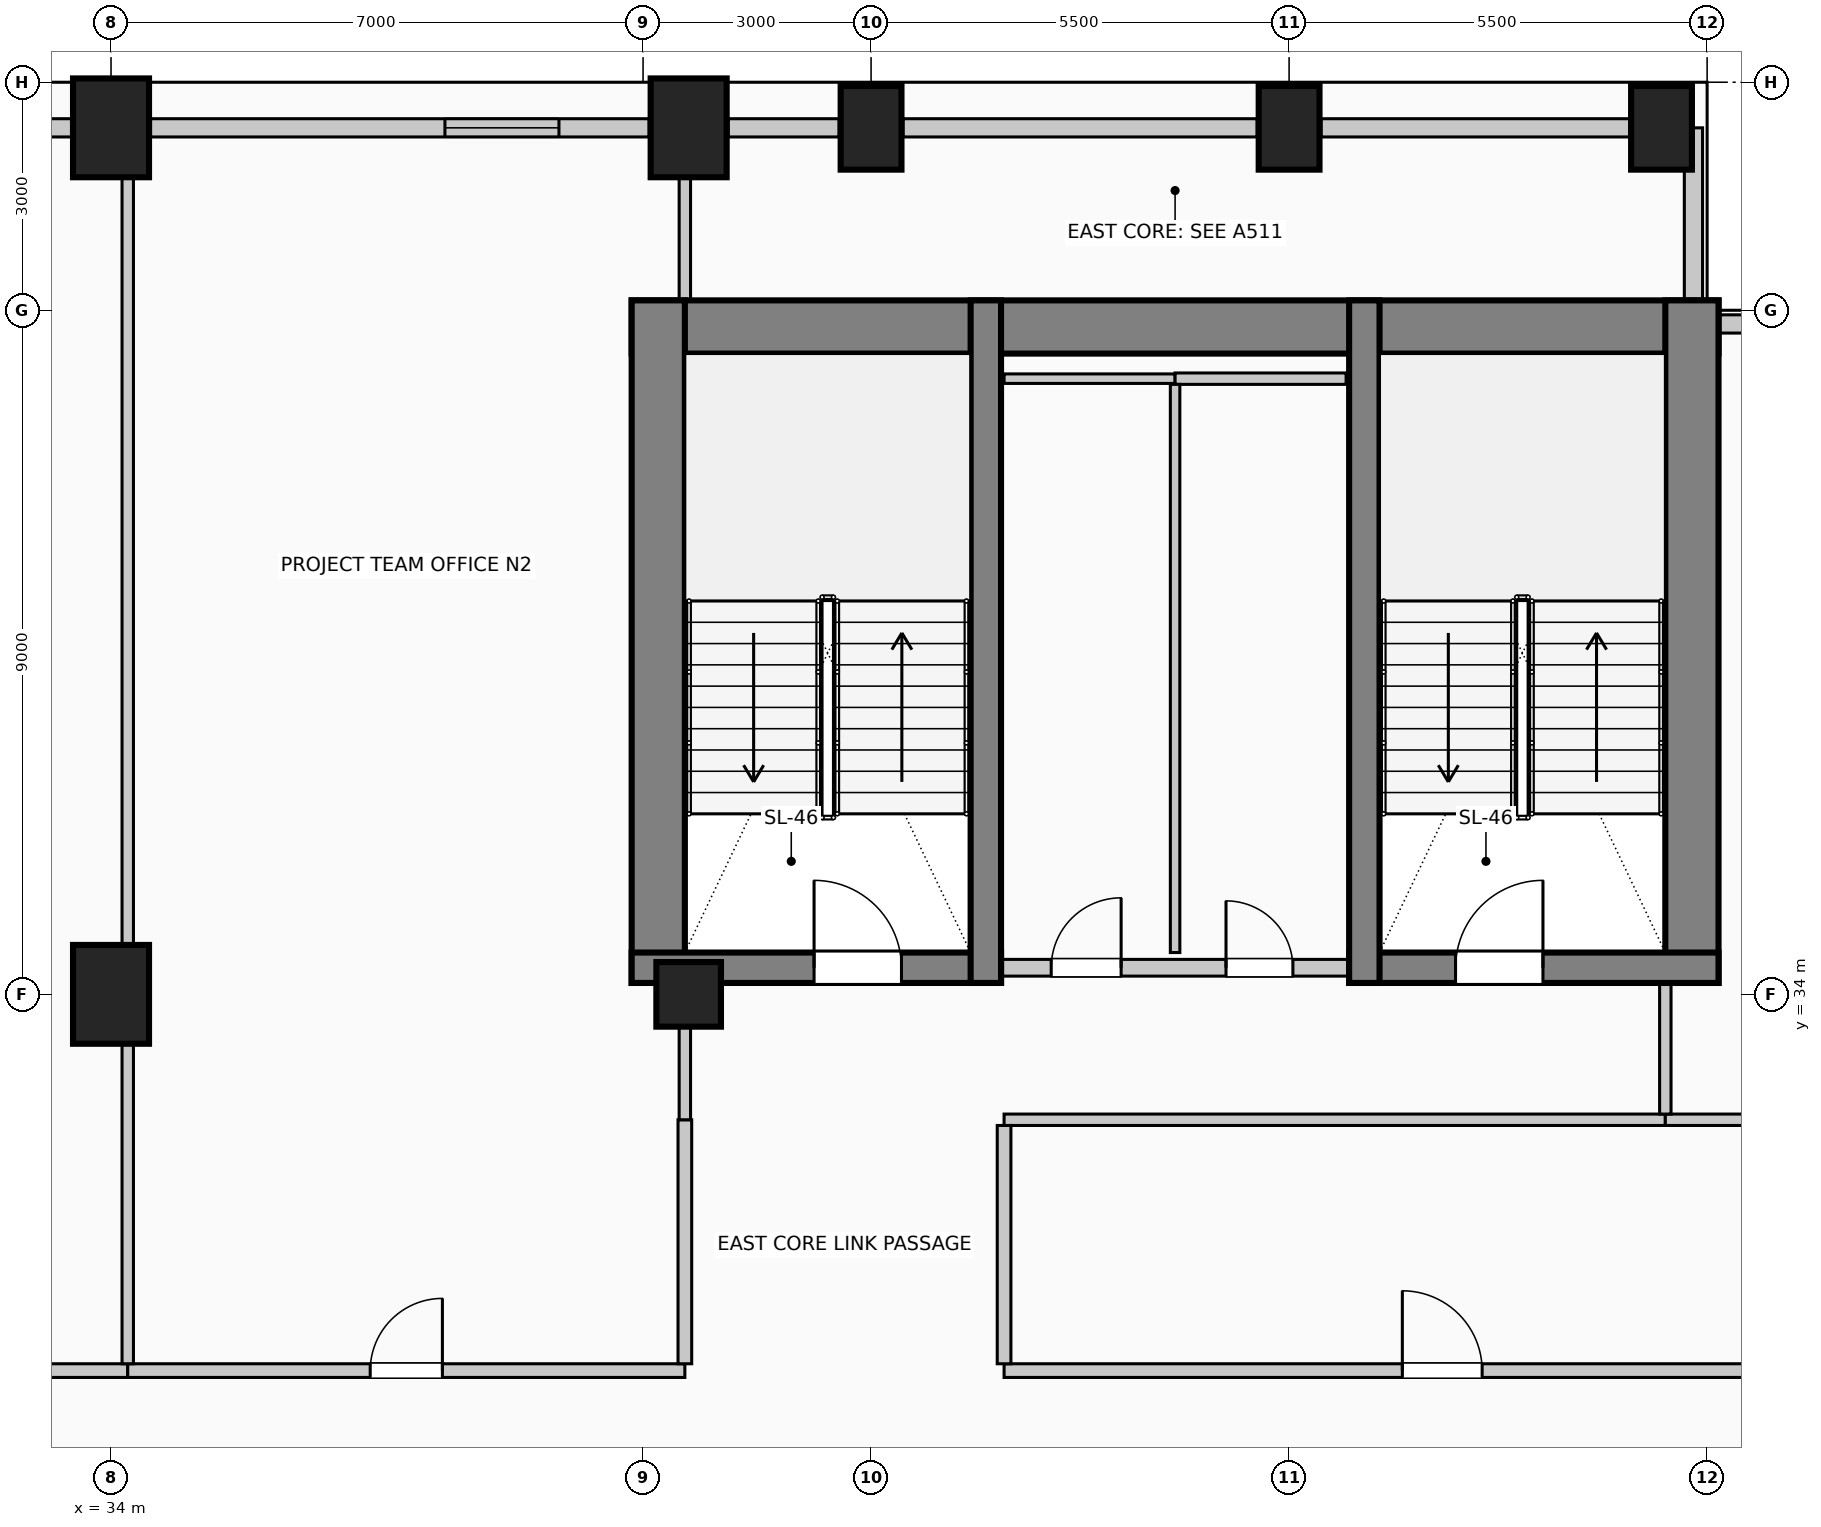
"""IFC4 building model, lengths in metres.
Left out: names, types, materials, properties, quantities, classifications, styles, units other than length and angle.
Written with IfcOpenShell. Run it as: python <this file> out.ifc"""

import sys

from ifc_helpers import new_model, si_unit, direction, frame, frame_2d, origin, origin_2d, place, context, subcontext, project, spatial, rectangle, circle, extrude, element, fill, save


model = new_model("IFC4")
c1 = context("Model", 3, precision=1e-05, world=origin(), true_north=direction((0.0, 1.0)))
c2 = subcontext(c1, "Body", "Model", "MODEL_VIEW")
j1 = project(units=[si_unit("LENGTHUNIT", "METRE"), si_unit("PLANEANGLEUNIT", "RADIAN")], contexts=[c1])
p1 = place(None, origin())
s1 = spatial("IfcSite", under=j1, at=p1, CompositionType="ELEMENT")
p2 = place(p1, origin())
s2 = spatial("IfcBuilding", under=s1, at=p2, CompositionType="ELEMENT")
p3 = place(p2, frame((0.0, 0.0, 210.6)))
s3 = spatial("IfcBuildingStorey", under=s2, at=p3, CompositionType="ELEMENT", Elevation=210.6)
p4 = place(p3, frame((40.85, 42.78, 0.0), z_axis=(0.0, 0.0, 1.0), x_axis=(1.0, 0.0, 0.0)))
e1 = element("IfcWall", 1, at=p4, inside=s3, PredefinedType="SHEAR", context=c2, shape_type="SweptSolid", body=[
    extrude(rectangle(XDim=14.3, YDim=0.7, at=frame_2d((7.15, 0.0))), origin(), (0.0, 0.0, 1.0), 4.0),
])
for number, where, z_axis, x_axis in (
    (2, (41.2, 34.15, 0.0), (0.0, 0.0, 1.0), (0.0, 1.0, 0.0)),
    (3, (54.8, 34.15, 0.0), (0.0, 0.0, 1.0), (0.0, 1.0, 0.0)),
):
    element("IfcWall", number, at=place(p3, frame(where, z_axis=z_axis, x_axis=x_axis)), inside=s3, PredefinedType="SHEAR", context=c2, shape_type="SweptSolid", body=[
        extrude(rectangle(XDim=8.98, YDim=0.7, at=frame_2d((4.49, 0.0))), origin(), (0.0, 0.0, 1.0), 4.0),
    ])
p5 = place(p3, frame((40.85, 34.35, 0.0), z_axis=(0.0, 0.0, 1.0), x_axis=(1.0, 0.0, 0.0)))
e4 = element("IfcWall", 4, at=p5, inside=s3, PredefinedType="SHEAR", context=c2, shape_type="SweptSolid", body=[
    extrude(rectangle(XDim=4.86, YDim=0.4, at=frame_2d((2.43, 0.0))), origin(), (0.0, 0.0, 1.0), 4.0),
])
p6 = place(p5, frame((2.4, 0.0, 0.0)))
e5 = element("IfcOpeningElement", 5, at=p6, cuts=e4, PredefinedType="OPENING", context=c2, shape_type="SweptSolid", body=[
    extrude(rectangle(XDim=1.15, YDim=2.2, at=frame_2d((0.575, 1.1))), frame((0.0, 0.21, 0.0), z_axis=(0.0, -1.0, 0.0), x_axis=(1.0, 0.0, 0.0)), (0.0, 0.0, 1.0), 0.42),
])
p7 = place(p3, frame((45.51, 34.15, 0.0), z_axis=(0.0, 0.0, 1.0), x_axis=(0.0, 1.0, 0.0)))
e6 = element("IfcWall", 6, at=p7, inside=s3, PredefinedType="SHEAR", context=c2, shape_type="SweptSolid", body=[
    extrude(rectangle(XDim=8.98, YDim=0.4, at=frame_2d((4.49, 0.0))), origin(), (0.0, 0.0, 1.0), 4.0),
])
p8 = place(p3, frame((50.29, 34.35, 0.0), z_axis=(0.0, 0.0, 1.0), x_axis=(1.0, 0.0, 0.0)))
e7 = element("IfcWall", 7, at=p8, inside=s3, PredefinedType="SHEAR", context=c2, shape_type="SweptSolid", body=[
    extrude(rectangle(XDim=4.86, YDim=0.4, at=frame_2d((2.43, 0.0))), origin(), (0.0, 0.0, 1.0), 4.0),
])
p9 = place(p8, frame((1.4, 0.0, 0.0)))
e8 = element("IfcOpeningElement", 8, at=p9, cuts=e7, PredefinedType="OPENING", context=c2, shape_type="SweptSolid", body=[
    extrude(rectangle(XDim=1.15, YDim=2.2, at=frame_2d((0.575, 1.1))), frame((0.0, 0.21, 0.0), z_axis=(0.0, -1.0, 0.0), x_axis=(1.0, 0.0, 0.0)), (0.0, 0.0, 1.0), 0.42),
])
p10 = place(p3, frame((50.49, 34.15, 0.0), z_axis=(0.0, 0.0, 1.0), x_axis=(0.0, 1.0, 0.0)))
e9 = element("IfcWall", 9, at=p10, inside=s3, PredefinedType="SHEAR", context=c2, shape_type="SweptSolid", body=[
    extrude(rectangle(XDim=8.98, YDim=0.4, at=frame_2d((4.49, 0.0))), origin(), (0.0, 0.0, 1.0), 4.0),
])
for number, where, z_axis, x_axis in (
    (10, (34.0, 45.4, 0.0), (0.0, 0.0, 1.0), (1.0, 0.0, 0.0)),
    (11, (41.6, 45.4, 0.0), (0.0, 0.0, 1.0), (1.0, 0.0, 0.0)),
):
    element("IfcColumn", number, at=place(p3, frame(where, z_axis=z_axis, x_axis=x_axis)), inside=s3, PredefinedType="COLUMN", context=c2, shape_type="SweptSolid", body=[
        extrude(rectangle(XDim=1.0, YDim=1.3, at=origin_2d()), origin(), (0.0, 0.0, 1.0), 4.0),
    ])
for number, where, z_axis, x_axis in (
    (12, (44.0, 45.4, 0.0), (0.0, 0.0, 1.0), (1.0, 0.0, 0.0)),
    (13, (49.5, 45.4, 0.0), (0.0, 0.0, 1.0), (1.0, 0.0, 0.0)),
    (14, (54.4, 45.4, 0.0), (0.0, 0.0, 1.0), (1.0, 0.0, 0.0)),
):
    element("IfcColumn", number, at=place(p3, frame(where, z_axis=z_axis, x_axis=x_axis)), inside=s3, PredefinedType="COLUMN", context=c2, shape_type="SweptSolid", body=[
        extrude(rectangle(XDim=0.8, YDim=1.1, at=origin_2d()), origin(), (0.0, 0.0, 1.0), 4.0),
    ])
p11 = place(p3, frame((34.0, 34.0, 0.0), z_axis=(0.0, 0.0, 1.0), x_axis=(1.0, 0.0, 0.0)))
e15 = element("IfcColumn", 15, at=p11, inside=s3, PredefinedType="COLUMN", context=c2, shape_type="SweptSolid", body=[
    extrude(rectangle(XDim=1.0, YDim=1.3, at=origin_2d()), origin(), (0.0, 0.0, 1.0), 4.0),
])
p12 = place(p3, frame((41.6, 34.0, 0.0), z_axis=(0.0, 0.0, 1.0), x_axis=(1.0, 0.0, 0.0)))
e16 = element("IfcColumn", 16, at=p12, inside=s3, PredefinedType="COLUMN", context=c2, shape_type="SweptSolid", body=[
    extrude(circle(Radius=0.425, at=origin_2d()), origin(), (0.0, 0.0, 1.0), 4.0),
])
p13 = place(p3, frame((29.42, 45.4, 0.0), z_axis=(0.0, 0.0, 1.0), x_axis=(1.0, 0.0, 0.0)))
e17 = element("IfcWall", 17, at=p13, inside=s3, PredefinedType="SOLIDWALL", context=c2, shape_type="SweptSolid", body=[
    extrude(rectangle(XDim=4.06, YDim=0.24, at=frame_2d((2.03, 0.0))), origin(), (0.0, 0.0, 1.0), 3.0),
])
p14 = place(p13, frame((1.28, 0.0, 0.42)))
e18 = element("IfcOpeningElement", 18, at=p14, cuts=e17, PredefinedType="OPENING", context=c2, shape_type="SweptSolid", body=[
    extrude(rectangle(XDim=1.5, YDim=2.2, at=frame_2d((0.75, 1.1))), frame((0.0, 0.13, 0.0), z_axis=(0.0, -1.0, 0.0), x_axis=(1.0, 0.0, 0.0)), (0.0, 0.0, 1.0), 0.26),
])
p15 = place(p3, frame((34.52, 45.4, 0.0), z_axis=(0.0, 0.0, 1.0), x_axis=(1.0, 0.0, 0.0)))
e19 = element("IfcWall", 19, at=p15, inside=s3, PredefinedType="SOLIDWALL", context=c2, shape_type="SweptSolid", body=[
    extrude(rectangle(XDim=6.56, YDim=0.24, at=frame_2d((3.28, 0.0))), origin(), (0.0, 0.0, 1.0), 3.0),
])
p16 = place(p15, frame((3.873, 0.0, 0.42)))
e20 = element("IfcOpeningElement", 20, at=p16, cuts=e19, PredefinedType="OPENING", context=c2, shape_type="SweptSolid", body=[
    extrude(rectangle(XDim=1.5, YDim=2.2, at=frame_2d((0.75, 1.1))), frame((0.0, 0.13, 0.0), z_axis=(0.0, -1.0, 0.0), x_axis=(1.0, 0.0, 0.0)), (0.0, 0.0, 1.0), 0.26),
])
p17 = place(p3, frame((42.12, 45.4, 0.0), z_axis=(0.0, 0.0, 1.0), x_axis=(1.0, 0.0, 0.0)))
e21 = element("IfcWall", 21, at=p17, inside=s3, PredefinedType="SOLIDWALL", context=c2, shape_type="SweptSolid", body=[
    extrude(rectangle(XDim=1.46, YDim=0.24, at=frame_2d((0.73, 0.0))), origin(), (0.0, 0.0, 1.0), 3.0),
])
p18 = place(p3, frame((44.42, 45.4, 0.0), z_axis=(0.0, 0.0, 1.0), x_axis=(1.0, 0.0, 0.0)))
e22 = element("IfcWall", 22, at=p18, inside=s3, PredefinedType="SOLIDWALL", context=c2, shape_type="SweptSolid", body=[
    extrude(rectangle(XDim=4.66, YDim=0.24, at=frame_2d((2.33, 0.0))), origin(), (0.0, 0.0, 1.0), 3.0),
])
p19 = place(p3, frame((49.92, 45.4, 0.0), z_axis=(0.0, 0.0, 1.0), x_axis=(1.0, 0.0, 0.0)))
e23 = element("IfcWall", 23, at=p19, inside=s3, PredefinedType="SOLIDWALL", context=c2, shape_type="SweptSolid", body=[
    extrude(rectangle(XDim=4.06, YDim=0.24, at=frame_2d((2.03, 0.0))), origin(), (0.0, 0.0, 1.0), 3.0),
])
p20 = place(p3, frame((54.82, 45.4, 0.0), z_axis=(0.0, 0.0, 1.0), x_axis=(0.0, -1.0, 0.0)))
e24 = element("IfcWall", 24, at=p20, inside=s3, PredefinedType="SOLIDWALL", context=c2, shape_type="SweptSolid", body=[
    extrude(rectangle(XDim=2.265, YDim=0.24, at=frame_2d((1.132, 0.0))), origin(), (0.0, 0.0, 1.0), 3.75),
])
p21 = place(p3, frame((55.155, 42.82, 0.0), z_axis=(0.0, 0.0, 1.0), x_axis=(1.0, 0.0, 0.0)))
e25 = element("IfcWall", 25, at=p21, inside=s3, PredefinedType="SOLIDWALL", context=c2, shape_type="SweptSolid", body=[
    extrude(rectangle(XDim=2.245, YDim=0.24, at=frame_2d((1.123, 0.0))), origin(), (0.0, 0.0, 1.0), 3.75),
])
p22 = place(p3, frame((45.72, 34.35, 0.0), z_axis=(0.0, 0.0, 1.0), x_axis=(1.0, 0.0, 0.0)))
e26 = element("IfcWall", 26, at=p22, inside=s3, PredefinedType="PARTITIONING", context=c2, shape_type="SweptSolid", body=[
    extrude(rectangle(XDim=4.56, YDim=0.22, at=frame_2d((2.28, 0.0))), origin(), (0.0, 0.0, 1.0), 3.75),
])
p23 = place(p22, frame((0.65, 0.0, 0.0)))
e27 = element("IfcOpeningElement", 27, at=p23, cuts=e26, PredefinedType="OPENING", context=c2, shape_type="SweptSolid", body=[
    extrude(rectangle(XDim=0.92, YDim=2.1, at=frame_2d((0.46, 1.05))), frame((0.0, 0.12, 0.0), z_axis=(0.0, -1.0, 0.0), x_axis=(1.0, 0.0, 0.0)), (0.0, 0.0, 1.0), 0.24),
])
p24 = place(p22, frame((2.95, 0.0, 0.0)))
e28 = element("IfcOpeningElement", 28, at=p24, cuts=e26, PredefinedType="OPENING", context=c2, shape_type="SweptSolid", body=[
    extrude(rectangle(XDim=0.88, YDim=2.1, at=frame_2d((0.44, 1.05))), frame((0.0, 0.12, 0.0), z_axis=(0.0, -1.0, 0.0), x_axis=(1.0, 0.0, 0.0)), (0.0, 0.0, 1.0), 0.24),
])
p25 = place(p3, frame((23.1, 29.05, 0.0), z_axis=(0.0, 0.0, 1.0), x_axis=(1.0, 0.0, 0.0)))
e29 = element("IfcWall", 29, at=p25, inside=s3, PredefinedType="PARTITIONING", context=c2, shape_type="SweptSolid", body=[
    extrude(rectangle(XDim=11.12, YDim=0.18, at=frame_2d((5.56, 0.0))), origin(), (0.0, 0.0, 1.0), 3.75),
])
p26 = place(p25, frame((5.035, 0.0, 0.0)))
e30 = element("IfcOpeningElement", 30, at=p26, cuts=e29, PredefinedType="OPENING", context=c2, shape_type="SweptSolid", body=[
    extrude(rectangle(XDim=1.05, YDim=2.15, at=frame_2d((0.525, 1.075))), frame((0.0, 0.1, 0.0), z_axis=(0.0, -1.0, 0.0), x_axis=(1.0, 0.0, 0.0)), (0.0, 0.0, 1.0), 0.2),
])
p27 = place(p3, frame((34.22, 29.05, 0.0), z_axis=(0.0, 0.0, 1.0), x_axis=(1.0, 0.0, 0.0)))
e31 = element("IfcWall", 31, at=p27, inside=s3, PredefinedType="PARTITIONING", context=c2, shape_type="SweptSolid", body=[
    extrude(rectangle(XDim=7.33, YDim=0.18, at=frame_2d((3.665, 0.0))), origin(), (0.0, 0.0, 1.0), 3.75),
])
p28 = place(p27, frame((3.19, 0.0, 0.0)))
e32 = element("IfcOpeningElement", 32, at=p28, cuts=e31, PredefinedType="OPENING", context=c2, shape_type="SweptSolid", body=[
    extrude(rectangle(XDim=0.95, YDim=2.15, at=frame_2d((0.475, 1.075))), frame((0.0, 0.1, 0.0), z_axis=(0.0, -1.0, 0.0), x_axis=(1.0, 0.0, 0.0)), (0.0, 0.0, 1.0), 0.2),
])
p29 = place(p3, frame((45.75, 29.05, 0.0), z_axis=(0.0, 0.0, 1.0), x_axis=(1.0, 0.0, 0.0)))
e33 = element("IfcWall", 33, at=p29, inside=s3, PredefinedType="PARTITIONING", context=c2, shape_type="SweptSolid", body=[
    extrude(rectangle(XDim=11.53, YDim=0.18, at=frame_2d((5.765, 0.0))), origin(), (0.0, 0.0, 1.0), 3.75),
])
p30 = place(p29, frame((5.24, 0.0, 0.0)))
e34 = element("IfcOpeningElement", 34, at=p30, cuts=e33, PredefinedType="OPENING", context=c2, shape_type="SweptSolid", body=[
    extrude(rectangle(XDim=1.05, YDim=2.15, at=frame_2d((0.525, 1.075))), frame((0.0, 0.1, 0.0), z_axis=(0.0, -1.0, 0.0), x_axis=(1.0, 0.0, 0.0)), (0.0, 0.0, 1.0), 0.2),
])
p31 = place(p3, frame((45.75, 32.35, 0.0), z_axis=(0.0, 0.0, 1.0), x_axis=(1.0, 0.0, 0.0)))
e35 = element("IfcWall", 35, at=p31, inside=s3, PredefinedType="PARTITIONING", context=c2, shape_type="SweptSolid", body=[
    extrude(rectangle(XDim=8.7, YDim=0.15, at=frame_2d((4.35, 0.0))), origin(), (0.0, 0.0, 1.0), 3.75),
])
p32 = place(p3, frame((54.45, 32.35, 0.0), z_axis=(0.0, 0.0, 1.0), x_axis=(1.0, 0.0, 0.0)))
e36 = element("IfcWall", 36, at=p32, inside=s3, PredefinedType="PARTITIONING", context=c2, shape_type="SweptSolid", body=[
    extrude(rectangle(XDim=2.83, YDim=0.15, at=frame_2d((1.415, 0.0))), origin(), (0.0, 0.0, 1.0), 3.75),
])
p33 = place(p3, frame((45.75, 42.1, 0.0), z_axis=(0.0, 0.0, 1.0), x_axis=(1.0, 0.0, 0.0)))
e37 = element("IfcWall", 37, at=p33, inside=s3, PredefinedType="PARTITIONING", context=c2, shape_type="SweptSolid", body=[
    extrude(rectangle(XDim=2.25, YDim=0.125, at=frame_2d((1.125, 0.0))), origin(), (0.0, 0.0, 1.0), 3.75),
])
p34 = place(p3, frame((48.0, 42.1, 0.0), z_axis=(0.0, 0.0, 1.0), x_axis=(1.0, 0.0, 0.0)))
e38 = element("IfcWall", 38, at=p34, inside=s3, PredefinedType="PARTITIONING", context=c2, shape_type="SweptSolid", body=[
    extrude(rectangle(XDim=2.25, YDim=0.15, at=frame_2d((1.125, 0.0))), origin(), (0.0, 0.0, 1.0), 3.75),
])
p35 = place(p3, frame((34.22, 29.14, 0.0), z_axis=(0.0, 0.0, 1.0), x_axis=(0.0, 1.0, 0.0)))
e39 = element("IfcWall", 39, at=p35, inside=s3, PredefinedType="PARTITIONING", context=c2, shape_type="SweptSolid", body=[
    extrude(rectangle(XDim=4.21, YDim=0.15, at=frame_2d((2.105, 0.0))), origin(), (0.0, 0.0, 1.0), 3.145),
])
p36 = place(p3, frame((34.22, 34.65, 0.0), z_axis=(0.0, 0.0, 1.0), x_axis=(0.0, 1.0, 0.0)))
e40 = element("IfcWall", 40, at=p36, inside=s3, PredefinedType="PARTITIONING", context=c2, shape_type="SweptSolid", body=[
    extrude(rectangle(XDim=10.1, YDim=0.15, at=frame_2d((5.05, 0.0))), origin(), (0.0, 0.0, 1.0), 3.145),
])
p37 = place(p3, frame((41.55, 29.14, 0.0), z_axis=(0.0, 0.0, 1.0), x_axis=(0.0, 1.0, 0.0)))
e41 = element("IfcWall", 41, at=p37, inside=s3, PredefinedType="PARTITIONING", context=c2, shape_type="SweptSolid", body=[
    extrude(rectangle(XDim=3.21, YDim=0.18, at=frame_2d((1.605, 0.0))), origin(), (0.0, 0.0, 1.0), 3.145),
])
p38 = place(p3, frame((41.55, 32.35, 0.0), z_axis=(0.0, 0.0, 1.0), x_axis=(0.0, 1.0, 0.0)))
e42 = element("IfcWall", 42, at=p38, inside=s3, PredefinedType="PARTITIONING", context=c2, shape_type="SweptSolid", body=[
    extrude(rectangle(XDim=1.225, YDim=0.15, at=frame_2d((0.612, 0.0))), origin(), (0.0, 0.0, 1.0), 3.145),
])
p39 = place(p3, frame((41.55, 43.13, 0.0), z_axis=(0.0, 0.0, 1.0), x_axis=(0.0, 1.0, 0.0)))
e43 = element("IfcWall", 43, at=p39, inside=s3, PredefinedType="PARTITIONING", context=c2, shape_type="SweptSolid", body=[
    extrude(rectangle(XDim=1.62, YDim=0.15, at=frame_2d((0.81, 0.0))), origin(), (0.0, 0.0, 1.0), 3.75),
])
p40 = place(p3, frame((45.75, 29.14, 0.0), z_axis=(0.0, 0.0, 1.0), x_axis=(0.0, 1.0, 0.0)))
e44 = element("IfcWall", 44, at=p40, inside=s3, PredefinedType="PARTITIONING", context=c2, shape_type="SweptSolid", body=[
    extrude(rectangle(XDim=3.135, YDim=0.18, at=frame_2d((1.567, 0.0))), origin(), (0.0, 0.0, 1.0), 3.75),
])
p41 = place(p3, frame((48.0, 34.55, 0.0), z_axis=(0.0, 0.0, 1.0), x_axis=(0.0, 1.0, 0.0)))
e45 = element("IfcWall", 45, at=p41, inside=s3, PredefinedType="PARTITIONING", context=c2, shape_type="SweptSolid", body=[
    extrude(rectangle(XDim=7.475, YDim=0.125, at=frame_2d((3.737, 0.0))), origin(), (0.0, 0.0, 1.0), 3.75),
])
p42 = place(p3, frame((54.45, 32.425, 0.0), z_axis=(0.0, 0.0, 1.0), x_axis=(0.0, 1.0, 0.0)))
e46 = element("IfcWall", 46, at=p42, inside=s3, PredefinedType="PARTITIONING", context=c2, shape_type="SweptSolid", body=[
    extrude(rectangle(XDim=1.725, YDim=0.15, at=frame_2d((0.862, 0.0))), origin(), (0.0, 0.0, 1.0), 3.75),
])
p43 = place(p16, origin())
e47 = element("IfcWindow", 47, at=p43, inside=s3, PartitioningType="SINGLE_PANEL", PredefinedType="WINDOW", context=c2, shape_type="SweptSolid", body=[
    extrude(rectangle(XDim=1.5, YDim=2.2, at=frame_2d((0.75, 1.1))), frame((0.0, 0.03, 0.0), z_axis=(0.0, -1.0, 0.0), x_axis=(1.0, 0.0, 0.0)), (0.0, 0.0, 1.0), 0.06),
])
fill(e20, e47)
p44 = place(p6, origin())
e48 = element("IfcDoor", 48, at=p44, inside=s3, OperationType="SINGLE_SWING_LEFT", PredefinedType="DOOR", context=c2, shape_type="SweptSolid", body=[
    extrude(rectangle(XDim=1.15, YDim=2.2, at=frame_2d((0.575, 1.1))), frame((0.0, 0.025, 0.0), z_axis=(0.0, -1.0, 0.0), x_axis=(1.0, 0.0, 0.0)), (0.0, 0.0, 1.0), 0.05),
])
fill(e5, e48)
p45 = place(p23, origin())
e49 = element("IfcDoor", 49, at=p45, inside=s3, OperationType="SINGLE_SWING_RIGHT", PredefinedType="DOOR", context=c2, shape_type="SweptSolid", body=[
    extrude(rectangle(XDim=0.92, YDim=2.1, at=frame_2d((0.46, 1.05))), frame((0.0, 0.025, 0.0), z_axis=(0.0, -1.0, 0.0), x_axis=(1.0, 0.0, 0.0)), (0.0, 0.0, 1.0), 0.05),
])
fill(e27, e49)
p46 = place(p24, origin())
e50 = element("IfcDoor", 50, at=p46, inside=s3, OperationType="SINGLE_SWING_LEFT", PredefinedType="DOOR", context=c2, shape_type="SweptSolid", body=[
    extrude(rectangle(XDim=0.88, YDim=2.1, at=frame_2d((0.44, 1.05))), frame((0.0, 0.025, 0.0), z_axis=(0.0, -1.0, 0.0), x_axis=(1.0, 0.0, 0.0)), (0.0, 0.0, 1.0), 0.05),
])
fill(e28, e50)
p47 = place(p9, origin())
e51 = element("IfcDoor", 51, at=p47, inside=s3, OperationType="SINGLE_SWING_RIGHT", PredefinedType="DOOR", context=c2, shape_type="SweptSolid", body=[
    extrude(rectangle(XDim=1.15, YDim=2.2, at=frame_2d((0.575, 1.1))), frame((0.0, 0.025, 0.0), z_axis=(0.0, -1.0, 0.0), x_axis=(1.0, 0.0, 0.0)), (0.0, 0.0, 1.0), 0.05),
])
fill(e8, e51)
p48 = place(p28, origin())
e52 = element("IfcDoor", 52, at=p48, inside=s3, OperationType="SINGLE_SWING_RIGHT", PredefinedType="DOOR", context=c2, shape_type="SweptSolid", body=[
    extrude(rectangle(XDim=0.95, YDim=2.15, at=frame_2d((0.475, 1.075))), frame((0.0, 0.025, 0.0), z_axis=(0.0, -1.0, 0.0), x_axis=(1.0, 0.0, 0.0)), (0.0, 0.0, 1.0), 0.05),
])
fill(e32, e52)
p49 = place(p30, origin())
e53 = element("IfcDoor", 53, at=p49, inside=s3, OperationType="SINGLE_SWING_LEFT", PredefinedType="DOOR", context=c2, shape_type="SweptSolid", body=[
    extrude(rectangle(XDim=1.05, YDim=2.15, at=frame_2d((0.525, 1.075))), frame((0.0, 0.025, 0.0), z_axis=(0.0, -1.0, 0.0), x_axis=(1.0, 0.0, 0.0)), (0.0, 0.0, 1.0), 0.05),
])
fill(e34, e53)
save(model, sys.argv[1])
